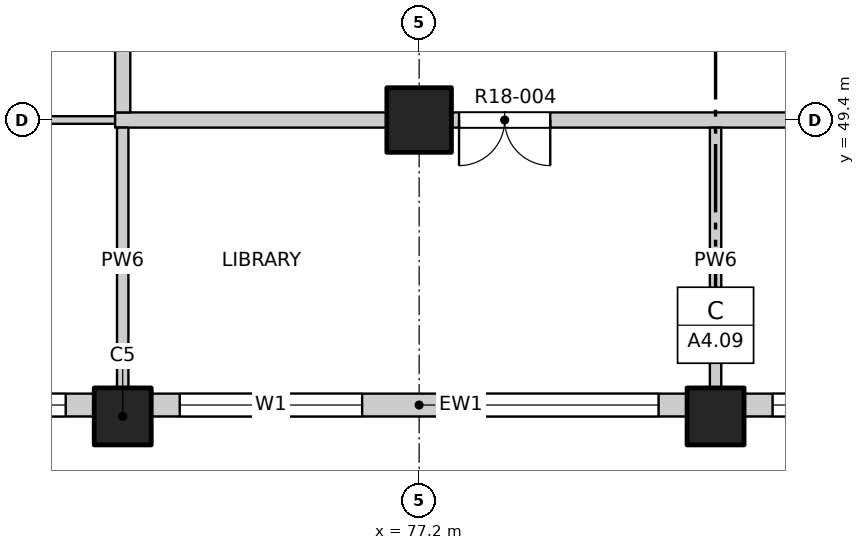
"""IFC4 building model, lengths in metres.
Left out: names, types, materials, properties, quantities, classifications, styles, units other than length and angle.
Written with IfcOpenShell. Run it as: python <this file> out.ifc"""

import sys

from ifc_helpers import new_model, si_unit, direction, frame, frame_2d, origin, origin_2d, place, context, subcontext, project, spatial, rectangle, extrude, element, fill, save


model = new_model("IFC4")
c1 = context("Model", 3, precision=1e-05, world=origin(), true_north=direction((0.0, 1.0)))
c2 = subcontext(c1, "Body", "Model", "MODEL_VIEW")
j1 = project(units=[si_unit("LENGTHUNIT", "METRE"), si_unit("PLANEANGLEUNIT", "RADIAN")], contexts=[c1])
p1 = place(None, origin())
s1 = spatial("IfcSite", under=j1, at=p1, CompositionType="ELEMENT")
p2 = place(p1, origin())
s2 = spatial("IfcBuilding", under=s1, at=p2, CompositionType="ELEMENT")
p3 = place(p2, frame((0.0, 0.0, 186.0)))
s3 = spatial("IfcBuildingStorey", under=s2, at=p3, CompositionType="ELEMENT", Elevation=186.0)
for number, where, z_axis, x_axis in (
    (1, (73.3, 45.5, -0.25), (0.0, 0.0, 1.0), (1.0, 0.0, 0.0)),
    (2, (81.1, 45.5, -0.25), (0.0, 0.0, 1.0), (1.0, 0.0, 0.0)),
):
    element("IfcColumn", number, at=place(p3, frame(where, z_axis=z_axis, x_axis=x_axis)), inside=s3, PredefinedType="COLUMN", context=c2, shape_type="SweptSolid", body=[
        extrude(rectangle(XDim=0.75, YDim=0.75, at=origin_2d()), origin(), (0.0, 0.0, 1.0), 3.4),
    ])
p4 = place(p3, frame((77.2, 49.4, -0.25), z_axis=(0.0, 0.0, 1.0), x_axis=(1.0, 0.0, 0.0)))
e3 = element("IfcColumn", 3, at=p4, inside=s3, PredefinedType="COLUMN", context=c2, shape_type="SweptSolid", body=[
    extrude(rectangle(XDim=0.85, YDim=0.85, at=origin_2d()), origin(), (0.0, 0.0, 1.0), 3.4),
])
p5 = place(p3, frame((69.4, 45.65, 0.0), z_axis=(0.0, 0.0, 1.0), x_axis=(1.0, 0.0, 0.0)))
e4 = element("IfcWall", 4, at=p5, inside=s3, PredefinedType="SOLIDWALL", context=c2, shape_type="SweptSolid", body=[
    extrude(rectangle(XDim=3.525, YDim=0.3, at=frame_2d((1.763, 0.0))), origin(), (0.0, 0.0, 1.0), 2.7),
])
p6 = place(p5, frame((0.75, 0.0, 0.9)))
e5 = element("IfcOpeningElement", 5, at=p6, cuts=e4, PredefinedType="OPENING", context=c2, shape_type="SweptSolid", body=[
    extrude(rectangle(XDim=2.4, YDim=1.8, at=frame_2d((1.2, 0.9))), frame((0.0, 0.16, 0.0), z_axis=(0.0, -1.0, 0.0), x_axis=(1.0, 0.0, 0.0)), (0.0, 0.0, 1.0), 0.32),
])
p7 = place(p3, frame((73.675, 45.65, 0.0), z_axis=(0.0, 0.0, 1.0), x_axis=(1.0, 0.0, 0.0)))
e6 = element("IfcWall", 6, at=p7, inside=s3, PredefinedType="SOLIDWALL", context=c2, shape_type="SweptSolid", body=[
    extrude(rectangle(XDim=7.05, YDim=0.3, at=frame_2d((3.525, 0.0))), origin(), (0.0, 0.0, 1.0), 2.7),
])
p8 = place(p7, frame((0.375, 0.0, 0.9)))
e7 = element("IfcOpeningElement", 7, at=p8, cuts=e6, PredefinedType="OPENING", context=c2, shape_type="SweptSolid", body=[
    extrude(rectangle(XDim=2.4, YDim=1.8, at=frame_2d((1.2, 0.9))), frame((0.0, 0.16, 0.0), z_axis=(0.0, -1.0, 0.0), x_axis=(1.0, 0.0, 0.0)), (0.0, 0.0, 1.0), 0.32),
])
p9 = place(p7, frame((4.275, 0.0, 0.9)))
e8 = element("IfcOpeningElement", 8, at=p9, cuts=e6, PredefinedType="OPENING", context=c2, shape_type="SweptSolid", body=[
    extrude(rectangle(XDim=2.4, YDim=1.8, at=frame_2d((1.2, 0.9))), frame((0.0, 0.16, 0.0), z_axis=(0.0, -1.0, 0.0), x_axis=(1.0, 0.0, 0.0)), (0.0, 0.0, 1.0), 0.32),
])
p10 = place(p3, frame((81.475, 45.65, 0.0), z_axis=(0.0, 0.0, 1.0), x_axis=(1.0, 0.0, 0.0)))
e9 = element("IfcWall", 9, at=p10, inside=s3, PredefinedType="SOLIDWALL", context=c2, shape_type="SweptSolid", body=[
    extrude(rectangle(XDim=7.05, YDim=0.3, at=frame_2d((3.525, 0.0))), origin(), (0.0, 0.0, 1.0), 2.7),
])
p11 = place(p10, frame((0.375, 0.0, 0.9)))
e10 = element("IfcOpeningElement", 10, at=p11, cuts=e9, PredefinedType="OPENING", context=c2, shape_type="SweptSolid", body=[
    extrude(rectangle(XDim=2.4, YDim=1.8, at=frame_2d((1.2, 0.9))), frame((0.0, 0.16, 0.0), z_axis=(0.0, -1.0, 0.0), x_axis=(1.0, 0.0, 0.0)), (0.0, 0.0, 1.0), 0.32),
])
p12 = place(p10, frame((4.275, 0.0, 0.9)))
e11 = element("IfcOpeningElement", 11, at=p12, cuts=e9, PredefinedType="OPENING", context=c2, shape_type="SweptSolid", body=[
    extrude(rectangle(XDim=2.4, YDim=1.8, at=frame_2d((1.2, 0.9))), frame((0.0, 0.16, 0.0), z_axis=(0.0, -1.0, 0.0), x_axis=(1.0, 0.0, 0.0)), (0.0, 0.0, 1.0), 0.32),
])
p13 = place(p3, frame((65.8, 49.4, 0.0), z_axis=(0.0, 0.0, 1.0), x_axis=(1.0, 0.0, 0.0)))
e12 = element("IfcWall", 12, at=p13, inside=s3, PredefinedType="PARTITIONING", context=c2, shape_type="SweptSolid", body=[
    extrude(rectangle(XDim=7.6, YDim=0.1, at=frame_2d((3.8, 0.0))), origin(), (0.0, 0.0, 1.0), 3.15),
])
p14 = place(p13, frame((4.14, 0.0, 0.0)))
e13 = element("IfcOpeningElement", 13, at=p14, cuts=e12, PredefinedType="OPENING", context=c2, shape_type="SweptSolid", body=[
    extrude(rectangle(XDim=0.9, YDim=2.1, at=frame_2d((0.45, 1.05))), frame((0.0, 0.06, 0.0), z_axis=(0.0, -1.0, 0.0), x_axis=(1.0, 0.0, 0.0)), (0.0, 0.0, 1.0), 0.12),
])
p15 = place(p3, frame((73.2, 49.4, 0.0), z_axis=(0.0, 0.0, 1.0), x_axis=(1.0, 0.0, 0.0)))
e14 = element("IfcWall", 14, at=p15, inside=s3, PredefinedType="PARTITIONING", context=c2, shape_type="SweptSolid", body=[
    extrude(rectangle(XDim=23.6, YDim=0.2, at=frame_2d((11.8, 0.0))), origin(), (0.0, 0.0, 1.0), 3.15),
])
p16 = place(p15, frame((4.525, 0.0, 0.0)))
e15 = element("IfcOpeningElement", 15, at=p16, cuts=e14, PredefinedType="OPENING", context=c2, shape_type="SweptSolid", body=[
    extrude(rectangle(XDim=1.2, YDim=2.1, at=frame_2d((0.6, 1.05))), frame((0.0, 0.11, 0.0), z_axis=(0.0, -1.0, 0.0), x_axis=(1.0, 0.0, 0.0)), (0.0, 0.0, 1.0), 0.22),
])
p17 = place(p15, frame((12.325, 0.0, 0.0)))
e16 = element("IfcOpeningElement", 16, at=p17, cuts=e14, PredefinedType="OPENING", context=c2, shape_type="SweptSolid", body=[
    extrude(rectangle(XDim=1.2, YDim=2.1, at=frame_2d((0.6, 1.05))), frame((0.0, 0.11, 0.0), z_axis=(0.0, -1.0, 0.0), x_axis=(1.0, 0.0, 0.0)), (0.0, 0.0, 1.0), 0.22),
])
p18 = place(p15, frame((20.125, 0.0, 0.0)))
e17 = element("IfcOpeningElement", 17, at=p18, cuts=e14, PredefinedType="OPENING", context=c2, shape_type="SweptSolid", body=[
    extrude(rectangle(XDim=1.2, YDim=2.1, at=frame_2d((0.6, 1.05))), frame((0.0, 0.11, 0.0), z_axis=(0.0, -1.0, 0.0), x_axis=(1.0, 0.0, 0.0)), (0.0, 0.0, 1.0), 0.22),
])
p19 = place(p3, frame((73.3, 45.8, 0.0), z_axis=(0.0, 0.0, 1.0), x_axis=(0.0, 1.0, 0.0)))
e18 = element("IfcWall", 18, at=p19, inside=s3, PredefinedType="PARTITIONING", context=c2, shape_type="SweptSolid", body=[
    extrude(rectangle(XDim=3.5, YDim=0.15, at=frame_2d((1.75, 0.0))), origin(), (0.0, 0.0, 1.0), 3.15),
])
p20 = place(p3, frame((73.3, 49.5, 0.0), z_axis=(0.0, 0.0, 1.0), x_axis=(0.0, 1.0, 0.0)))
e19 = element("IfcWall", 19, at=p20, inside=s3, PredefinedType="PARTITIONING", context=c2, shape_type="SweptSolid", body=[
    extrude(rectangle(XDim=34.7, YDim=0.2, at=frame_2d((17.35, 0.0))), origin(), (0.0, 0.0, 1.0), 3.15),
])
p21 = place(p20, frame((13.825, 0.0, 0.0)))
e20 = element("IfcOpeningElement", 20, at=p21, cuts=e19, PredefinedType="OPENING", context=c2, shape_type="SweptSolid", body=[
    extrude(rectangle(XDim=1.0, YDim=2.1, at=frame_2d((0.5, 1.05))), frame((0.0, 0.11, 0.0), z_axis=(0.0, -1.0, 0.0), x_axis=(1.0, 0.0, 0.0)), (0.0, 0.0, 1.0), 0.22),
])
p22 = place(p20, frame((21.975, 0.0, 0.0)))
e21 = element("IfcOpeningElement", 21, at=p22, cuts=e19, PredefinedType="OPENING", context=c2, shape_type="SweptSolid", body=[
    extrude(rectangle(XDim=1.0, YDim=2.1, at=frame_2d((0.5, 1.05))), frame((0.0, 0.11, 0.0), z_axis=(0.0, -1.0, 0.0), x_axis=(1.0, 0.0, 0.0)), (0.0, 0.0, 1.0), 0.22),
])
p23 = place(p3, frame((81.1, 45.8, 0.0), z_axis=(0.0, 0.0, 1.0), x_axis=(0.0, 1.0, 0.0)))
e22 = element("IfcWall", 22, at=p23, inside=s3, PredefinedType="PARTITIONING", context=c2, shape_type="SweptSolid", body=[
    extrude(rectangle(XDim=3.5, YDim=0.15, at=frame_2d((1.75, 0.0))), origin(), (0.0, 0.0, 1.0), 3.15),
])
p24 = place(p6, origin())
e23 = element("IfcWindow", 23, at=p24, inside=s3, PartitioningType="DOUBLE_PANEL_VERTICAL", PredefinedType="WINDOW", context=c2, shape_type="SweptSolid", body=[
    extrude(rectangle(XDim=2.4, YDim=1.8, at=frame_2d((1.2, 0.9))), frame((0.0, 0.03, 0.0), z_axis=(0.0, -1.0, 0.0), x_axis=(1.0, 0.0, 0.0)), (0.0, 0.0, 1.0), 0.06),
])
fill(e5, e23)
p25 = place(p8, origin())
e24 = element("IfcWindow", 24, at=p25, inside=s3, PartitioningType="DOUBLE_PANEL_VERTICAL", PredefinedType="WINDOW", context=c2, shape_type="SweptSolid", body=[
    extrude(rectangle(XDim=2.4, YDim=1.8, at=frame_2d((1.2, 0.9))), frame((0.0, 0.03, 0.0), z_axis=(0.0, -1.0, 0.0), x_axis=(1.0, 0.0, 0.0)), (0.0, 0.0, 1.0), 0.06),
])
fill(e7, e24)
p26 = place(p9, origin())
e25 = element("IfcWindow", 25, at=p26, inside=s3, PartitioningType="DOUBLE_PANEL_VERTICAL", PredefinedType="WINDOW", context=c2, shape_type="SweptSolid", body=[
    extrude(rectangle(XDim=2.4, YDim=1.8, at=frame_2d((1.2, 0.9))), frame((0.0, 0.03, 0.0), z_axis=(0.0, -1.0, 0.0), x_axis=(1.0, 0.0, 0.0)), (0.0, 0.0, 1.0), 0.06),
])
fill(e8, e25)
p27 = place(p11, origin())
e26 = element("IfcWindow", 26, at=p27, inside=s3, PartitioningType="DOUBLE_PANEL_VERTICAL", PredefinedType="WINDOW", context=c2, shape_type="SweptSolid", body=[
    extrude(rectangle(XDim=2.4, YDim=1.8, at=frame_2d((1.2, 0.9))), frame((0.0, 0.03, 0.0), z_axis=(0.0, -1.0, 0.0), x_axis=(1.0, 0.0, 0.0)), (0.0, 0.0, 1.0), 0.06),
])
fill(e10, e26)
p28 = place(p16, origin())
e27 = element("IfcDoor", 27, at=p28, inside=s3, OperationType="DOUBLE_DOOR_SINGLE_SWING", PredefinedType="DOOR", context=c2, shape_type="SweptSolid", body=[
    extrude(rectangle(XDim=1.2, YDim=2.1, at=frame_2d((0.6, 1.05))), frame((0.0, 0.025, 0.0), z_axis=(0.0, -1.0, 0.0), x_axis=(1.0, 0.0, 0.0)), (0.0, 0.0, 1.0), 0.05),
])
fill(e15, e27)
save(model, sys.argv[1])
